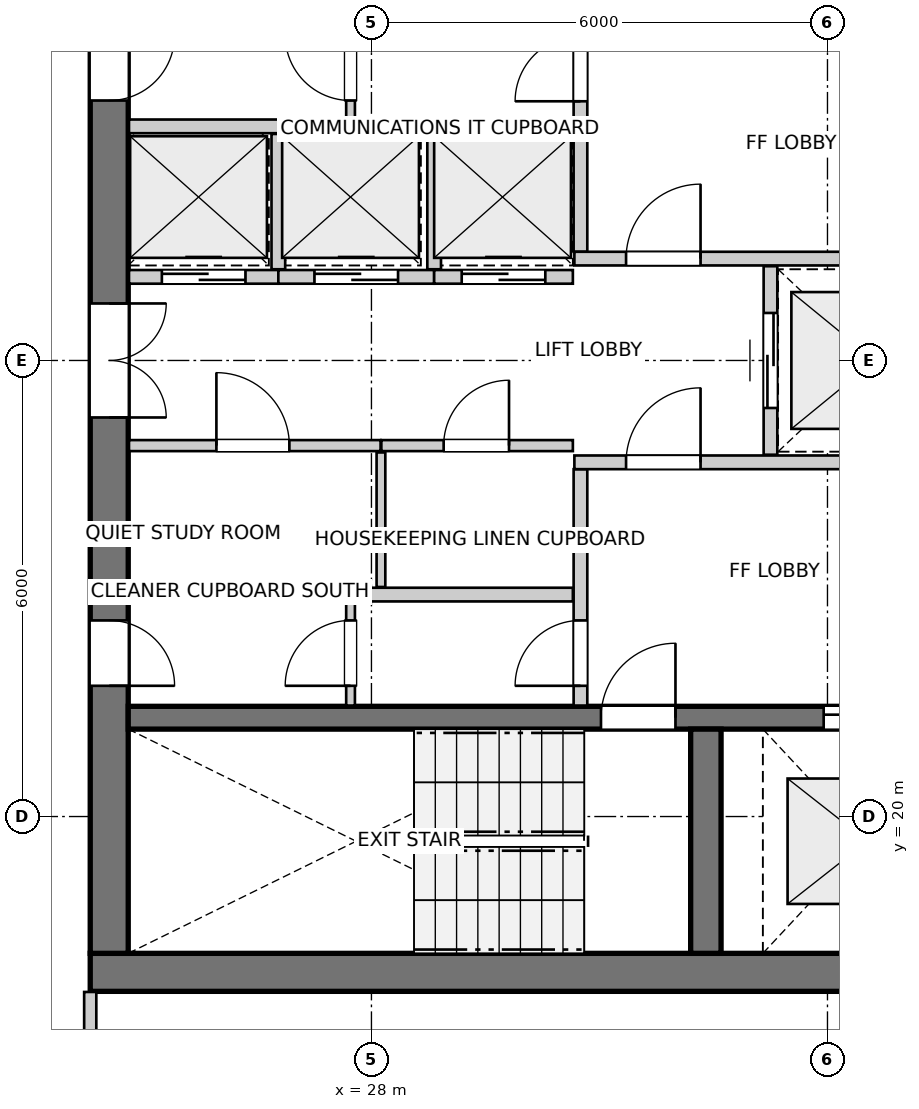
"""IFC4 building model, lengths in metres.
Left out: names, types, materials, properties, quantities, classifications, styles, units other than length and angle.
Written with IfcOpenShell. Run it as: python <this file> out.ifc"""

import sys

from ifc_helpers import new_model, si_unit, direction, frame, frame_2d, origin, place, context, subcontext, project, spatial, rectangle, extrude, source, transform, mapped, element, fill, save


model = new_model("IFC4")
c1 = context("Model", 3, precision=1e-05, world=origin(), true_north=direction((0.0, 1.0)))
c2 = subcontext(c1, "Body", "Model", "MODEL_VIEW")
j1 = project(units=[si_unit("LENGTHUNIT", "METRE"), si_unit("PLANEANGLEUNIT", "RADIAN")], contexts=[c1])
p1 = place(None, origin())
s1 = spatial("IfcSite", under=j1, at=p1, CompositionType="ELEMENT")
p2 = place(p1, origin())
s2 = spatial("IfcBuilding", under=s1, at=p2, CompositionType="ELEMENT")
p3 = place(p2, frame((0.0, 0.0, 205.2)))
s3 = spatial("IfcBuildingStorey", under=s2, at=p3, CompositionType="ELEMENT", Elevation=205.2)
p4 = place(p3, frame((24.3, 17.95, 0.0), z_axis=(0.0, 0.0, 1.0), x_axis=(1.0, 0.0, 0.0)))
e1 = element("IfcWall", 1, at=p4, inside=s3, PredefinedType="SHEAR", context=c2, shape_type="SweptSolid", body=[
    extrude(rectangle(XDim=12.1, YDim=0.5, at=frame_2d((6.05, 0.0))), origin(), (0.0, 0.0, 1.0), 2.935),
])
p5 = place(p3, frame((24.55, 33.8, 0.0), z_axis=(0.0, 0.0, 1.0), x_axis=(0.0, -1.0, 0.0)))
e2 = element("IfcWall", 2, at=p5, inside=s3, PredefinedType="SHEAR", context=c2, shape_type="SweptSolid", body=[
    extrude(rectangle(XDim=15.6, YDim=0.5, at=frame_2d((7.8, 0.0))), origin(), (0.0, 0.0, 1.0), 2.935),
])
p6 = place(p5, frame((7.05, 0.0, 0.0)))
e3 = element("IfcOpeningElement", 3, at=p6, cuts=e2, PredefinedType="OPENING", context=c2, shape_type="SweptSolid", body=[
    extrude(rectangle(XDim=1.5, YDim=2.15, at=frame_2d((0.75, 1.075))), frame((0.0, 0.26, 0.0), z_axis=(0.0, -1.0, 0.0), x_axis=(1.0, 0.0, 0.0)), (0.0, 0.0, 1.0), 0.52),
])
p7 = place(p5, frame((3.52, 0.0, 0.0)))
e4 = element("IfcOpeningElement", 4, at=p7, cuts=e2, PredefinedType="OPENING", context=c2, shape_type="SweptSolid", body=[
    extrude(rectangle(XDim=0.86, YDim=2.05, at=frame_2d((0.43, 1.025))), frame((0.0, 0.26, 0.0), z_axis=(0.0, -1.0, 0.0), x_axis=(1.0, 0.0, 0.0)), (0.0, 0.0, 1.0), 0.52),
])
p8 = place(p5, frame((11.22, 0.0, 0.0)))
e5 = element("IfcOpeningElement", 5, at=p8, cuts=e2, PredefinedType="OPENING", context=c2, shape_type="SweptSolid", body=[
    extrude(rectangle(XDim=0.86, YDim=2.05, at=frame_2d((0.43, 1.025))), frame((0.0, 0.26, 0.0), z_axis=(0.0, -1.0, 0.0), x_axis=(1.0, 0.0, 0.0)), (0.0, 0.0, 1.0), 0.52),
])
p9 = place(p3, frame((24.8, 21.3, 0.0), z_axis=(0.0, 0.0, 1.0), x_axis=(1.0, 0.0, 0.0)))
e6 = element("IfcWall", 6, at=p9, inside=s3, PredefinedType="SHEAR", context=c2, shape_type="SweptSolid", body=[
    extrude(rectangle(XDim=11.1, YDim=0.3, at=frame_2d((5.55, 0.0))), origin(), (0.0, 0.0, 1.0), 2.935),
])
p10 = place(p9, frame((6.22, 0.0, 0.0)))
e7 = element("IfcOpeningElement", 7, at=p10, cuts=e6, PredefinedType="OPENING", context=c2, shape_type="SweptSolid", body=[
    extrude(rectangle(XDim=0.98, YDim=2.15, at=frame_2d((0.49, 1.075))), frame((0.0, 0.16, 0.0), z_axis=(0.0, -1.0, 0.0), x_axis=(1.0, 0.0, 0.0)), (0.0, 0.0, 1.0), 0.32),
])
p11 = place(p9, frame((9.15, 0.0, 0.0)))
e8 = element("IfcOpeningElement", 8, at=p11, cuts=e6, PredefinedType="OPENING", context=c2, shape_type="SweptSolid", body=[
    extrude(rectangle(XDim=1.15, YDim=2.15, at=frame_2d((0.575, 1.075))), frame((0.0, 0.16, 0.0), z_axis=(0.0, -1.0, 0.0), x_axis=(1.0, 0.0, 0.0)), (0.0, 0.0, 1.0), 0.32),
])
p12 = place(p3, frame((32.4, 18.2, 0.0), z_axis=(0.0, 0.0, 1.0), x_axis=(0.0, 1.0, 0.0)))
e9 = element("IfcWall", 9, at=p12, inside=s3, PredefinedType="SHEAR", context=c2, shape_type="SweptSolid", body=[
    extrude(rectangle(XDim=2.95, YDim=0.4, at=frame_2d((1.475, 0.0))), origin(), (0.0, 0.0, 1.0), 2.935),
])
p13 = place(p3, frame((30.75, 21.46, 0.0), z_axis=(0.0, 0.0, 1.0), x_axis=(0.0, 1.0, 0.0)))
e10 = element("IfcWall", 10, at=p13, inside=s3, PredefinedType="PARTITIONING", context=c2, shape_type="SweptSolid", body=[
    extrude(rectangle(XDim=3.11, YDim=0.18, at=frame_2d((1.555, 0.0))), origin(), (0.0, 0.0, 1.0), 2.935),
])
p14 = place(p13, frame((0.26, 0.0, 0.0)))
e11 = element("IfcOpeningElement", 11, at=p14, cuts=e10, PredefinedType="OPENING", context=c2, shape_type="SweptSolid", body=[
    extrude(rectangle(XDim=0.86, YDim=2.05, at=frame_2d((0.43, 1.025))), frame((0.0, 0.1, 0.0), z_axis=(0.0, -1.0, 0.0), x_axis=(1.0, 0.0, 0.0)), (0.0, 0.0, 1.0), 0.2),
])
p15 = place(p3, frame((30.67, 24.66, 0.0), z_axis=(0.0, 0.0, 1.0), x_axis=(1.0, 0.0, 0.0)))
e12 = element("IfcWall", 12, at=p15, inside=s3, PredefinedType="PARTITIONING", context=c2, shape_type="SweptSolid", body=[
    extrude(rectangle(XDim=5.22, YDim=0.18, at=frame_2d((2.61, 0.0))), origin(), (0.0, 0.0, 1.0), 2.935),
])
p16 = place(p15, frame((0.68, 0.0, 0.0)))
e13 = element("IfcOpeningElement", 13, at=p16, cuts=e12, PredefinedType="OPENING", context=c2, shape_type="SweptSolid", body=[
    extrude(rectangle(XDim=0.98, YDim=2.15, at=frame_2d((0.49, 1.075))), frame((0.0, 0.1, 0.0), z_axis=(0.0, -1.0, 0.0), x_axis=(1.0, 0.0, 0.0)), (0.0, 0.0, 1.0), 0.2),
])
p17 = place(p3, frame((30.75, 27.43, 0.0), z_axis=(0.0, 0.0, 1.0), x_axis=(0.0, 1.0, 0.0)))
e14 = element("IfcWall", 14, at=p17, inside=s3, PredefinedType="PARTITIONING", context=c2, shape_type="SweptSolid", body=[
    extrude(rectangle(XDim=3.11, YDim=0.18, at=frame_2d((1.555, 0.0))), origin(), (0.0, 0.0, 1.0), 2.935),
])
p18 = place(p17, frame((1.98, 0.0, 0.0)))
e15 = element("IfcOpeningElement", 15, at=p18, cuts=e14, PredefinedType="OPENING", context=c2, shape_type="SweptSolid", body=[
    extrude(rectangle(XDim=0.86, YDim=2.05, at=frame_2d((0.43, 1.025))), frame((0.0, 0.1, 0.0), z_axis=(0.0, -1.0, 0.0), x_axis=(1.0, 0.0, 0.0)), (0.0, 0.0, 1.0), 0.2),
])
p19 = place(p3, frame((30.67, 27.34, 0.0), z_axis=(0.0, 0.0, 1.0), x_axis=(1.0, 0.0, 0.0)))
e16 = element("IfcWall", 16, at=p19, inside=s3, PredefinedType="PARTITIONING", context=c2, shape_type="SweptSolid", body=[
    extrude(rectangle(XDim=5.22, YDim=0.18, at=frame_2d((2.61, 0.0))), origin(), (0.0, 0.0, 1.0), 2.935),
])
p20 = place(p19, frame((0.68, 0.0, 0.0)))
e17 = element("IfcOpeningElement", 17, at=p20, cuts=e16, PredefinedType="OPENING", context=c2, shape_type="SweptSolid", body=[
    extrude(rectangle(XDim=0.98, YDim=2.15, at=frame_2d((0.49, 1.075))), frame((0.0, 0.1, 0.0), z_axis=(0.0, -1.0, 0.0), x_axis=(1.0, 0.0, 0.0)), (0.0, 0.0, 1.0), 0.2),
])
p21 = place(p3, frame((33.25, 24.76, 0.0), z_axis=(0.0, 0.0, 1.0), x_axis=(0.0, 1.0, 0.0)))
e18 = element("IfcWall", 18, at=p21, inside=s3, PredefinedType="PARTITIONING", context=c2, shape_type="SweptSolid", body=[
    extrude(rectangle(XDim=2.48, YDim=0.18, at=frame_2d((1.24, 0.0))), origin(), (0.0, 0.0, 1.0), 2.935),
])
p22 = place(p21, frame((0.615, 0.0, 0.0)))
e19 = element("IfcOpeningElement", 19, at=p22, cuts=e18, PredefinedType="OPENING", context=c2, shape_type="SweptSolid", body=[
    extrude(rectangle(XDim=1.25, YDim=2.15, at=frame_2d((0.625, 1.075))), frame((0.0, 0.1, 0.0), z_axis=(0.0, -1.0, 0.0), x_axis=(1.0, 0.0, 0.0)), (0.0, 0.0, 1.0), 0.2),
])
p23 = place(p3, frame((24.81, 22.92, 0.0), z_axis=(0.0, 0.0, 1.0), x_axis=(1.0, 0.0, 0.0)))
e20 = element("IfcWall", 20, at=p23, inside=s3, PredefinedType="PARTITIONING", context=c2, shape_type="SweptSolid", body=[
    extrude(rectangle(XDim=5.84, YDim=0.18, at=frame_2d((2.92, 0.0))), origin(), (0.0, 0.0, 1.0), 2.935),
])
p24 = place(p3, frame((24.81, 24.88, 0.0), z_axis=(0.0, 0.0, 1.0), x_axis=(1.0, 0.0, 0.0)))
e21 = element("IfcWall", 21, at=p24, inside=s3, PredefinedType="PARTITIONING", context=c2, shape_type="SweptSolid", body=[
    extrude(rectangle(XDim=3.31, YDim=0.145, at=frame_2d((1.655, 0.0))), origin(), (0.0, 0.0, 1.0), 2.935),
])
p25 = place(p24, frame((1.15, 0.0, 0.0)))
e22 = element("IfcOpeningElement", 22, at=p25, cuts=e21, PredefinedType="OPENING", context=c2, shape_type="SweptSolid", body=[
    extrude(rectangle(XDim=0.96, YDim=2.1, at=frame_2d((0.48, 1.05))), frame((0.0, 0.083, 0.0), z_axis=(0.0, -1.0, 0.0), x_axis=(1.0, 0.0, 0.0)), (0.0, 0.0, 1.0), 0.165),
])
p26 = place(p3, frame((28.13, 24.88, 0.0), z_axis=(0.0, 0.0, 1.0), x_axis=(1.0, 0.0, 0.0)))
e23 = element("IfcWall", 23, at=p26, inside=s3, PredefinedType="PARTITIONING", context=c2, shape_type="SweptSolid", body=[
    extrude(rectangle(XDim=2.52, YDim=0.145, at=frame_2d((1.26, 0.0))), origin(), (0.0, 0.0, 1.0), 2.935),
])
p27 = place(p26, frame((0.82, 0.0, 0.0)))
e24 = element("IfcOpeningElement", 24, at=p27, cuts=e23, PredefinedType="OPENING", context=c2, shape_type="SweptSolid", body=[
    extrude(rectangle(XDim=0.86, YDim=2.05, at=frame_2d((0.43, 1.025))), frame((0.0, 0.083, 0.0), z_axis=(0.0, -1.0, 0.0), x_axis=(1.0, 0.0, 0.0)), (0.0, 0.0, 1.0), 0.165),
])
p28 = place(p3, frame((28.125, 23.02, 0.0), z_axis=(0.0, 0.0, 1.0), x_axis=(0.0, 1.0, 0.0)))
e25 = element("IfcWall", 25, at=p28, inside=s3, PredefinedType="PARTITIONING", context=c2, shape_type="SweptSolid", body=[
    extrude(rectangle(XDim=1.77, YDim=0.115, at=frame_2d((0.885, 0.0))), origin(), (0.0, 0.0, 1.0), 2.935),
])
p29 = place(p3, frame((24.81, 29.08, 0.0), z_axis=(0.0, 0.0, 1.0), x_axis=(1.0, 0.0, 0.0)))
e26 = element("IfcWall", 26, at=p29, inside=s3, PredefinedType="PARTITIONING", context=c2, shape_type="SweptSolid", body=[
    extrude(rectangle(XDim=5.84, YDim=0.18, at=frame_2d((2.92, 0.0))), origin(), (0.0, 0.0, 1.0), 2.935),
])
p30 = place(p3, frame((24.81, 27.1, 0.0), z_axis=(0.0, 0.0, 1.0), x_axis=(1.0, 0.0, 0.0)))
e27 = element("IfcWall", 27, at=p30, inside=s3, PredefinedType="PARTITIONING", context=c2, shape_type="SweptSolid", body=[
    extrude(rectangle(XDim=1.965, YDim=0.18, at=frame_2d((0.982, 0.0))), origin(), (0.0, 0.0, 1.0), 2.935),
])
p31 = place(p30, frame((0.433, 0.0, 0.0)))
e28 = element("IfcOpeningElement", 28, at=p31, cuts=e27, PredefinedType="OPENING", context=c2, shape_type="SweptSolid", body=[
    extrude(rectangle(XDim=1.1, YDim=2.15, at=frame_2d((0.55, 1.075))), frame((0.0, 0.1, 0.0), z_axis=(0.0, -1.0, 0.0), x_axis=(1.0, 0.0, 0.0)), (0.0, 0.0, 1.0), 0.2),
])
p32 = place(p3, frame((26.775, 27.1, 0.0), z_axis=(0.0, 0.0, 1.0), x_axis=(1.0, 0.0, 0.0)))
e29 = element("IfcWall", 29, at=p32, inside=s3, PredefinedType="PARTITIONING", context=c2, shape_type="SweptSolid", body=[
    extrude(rectangle(XDim=2.05, YDim=0.18, at=frame_2d((1.025, 0.0))), origin(), (0.0, 0.0, 1.0), 2.935),
])
p33 = place(p32, frame((0.475, 0.0, 0.0)))
e30 = element("IfcOpeningElement", 30, at=p33, cuts=e29, PredefinedType="OPENING", context=c2, shape_type="SweptSolid", body=[
    extrude(rectangle(XDim=1.1, YDim=2.15, at=frame_2d((0.55, 1.075))), frame((0.0, 0.1, 0.0), z_axis=(0.0, -1.0, 0.0), x_axis=(1.0, 0.0, 0.0)), (0.0, 0.0, 1.0), 0.2),
])
p34 = place(p3, frame((26.775, 27.2, 0.0), z_axis=(0.0, 0.0, 1.0), x_axis=(0.0, 1.0, 0.0)))
e31 = element("IfcWall", 31, at=p34, inside=s3, PredefinedType="PARTITIONING", context=c2, shape_type="SweptSolid", body=[
    extrude(rectangle(XDim=1.78, YDim=0.18, at=frame_2d((0.89, 0.0))), origin(), (0.0, 0.0, 1.0), 2.935),
])
p35 = place(p3, frame((28.825, 27.1, 0.0), z_axis=(0.0, 0.0, 1.0), x_axis=(1.0, 0.0, 0.0)))
e32 = element("IfcWall", 32, at=p35, inside=s3, PredefinedType="PARTITIONING", context=c2, shape_type="SweptSolid", body=[
    extrude(rectangle(XDim=1.825, YDim=0.18, at=frame_2d((0.913, 0.0))), origin(), (0.0, 0.0, 1.0), 2.935),
])
p36 = place(p35, frame((0.363, 0.0, 0.0)))
e33 = element("IfcOpeningElement", 33, at=p36, cuts=e32, PredefinedType="OPENING", context=c2, shape_type="SweptSolid", body=[
    extrude(rectangle(XDim=1.1, YDim=2.15, at=frame_2d((0.55, 1.075))), frame((0.0, 0.1, 0.0), z_axis=(0.0, -1.0, 0.0), x_axis=(1.0, 0.0, 0.0)), (0.0, 0.0, 1.0), 0.2),
])
p37 = place(p3, frame((28.825, 27.2, 0.0), z_axis=(0.0, 0.0, 1.0), x_axis=(0.0, 1.0, 0.0)))
e34 = element("IfcWall", 34, at=p37, inside=s3, PredefinedType="PARTITIONING", context=c2, shape_type="SweptSolid", body=[
    extrude(rectangle(XDim=1.78, YDim=0.18, at=frame_2d((0.89, 0.0))), origin(), (0.0, 0.0, 1.0), 2.935),
])
p38 = place(p3, frame((27.725, 21.46, 0.0), z_axis=(0.0, 0.0, 1.0), x_axis=(0.0, 1.0, 0.0)))
e35 = element("IfcWall", 35, at=p38, inside=s3, PredefinedType="PARTITIONING", context=c2, shape_type="SweptSolid", body=[
    extrude(rectangle(XDim=1.38, YDim=0.115, at=frame_2d((0.69, 0.0))), origin(), (0.0, 0.0, 1.0), 2.935),
])
p39 = place(p38, frame((0.26, 0.0, 0.0)))
e36 = element("IfcOpeningElement", 36, at=p39, cuts=e35, PredefinedType="OPENING", context=c2, shape_type="SweptSolid", body=[
    extrude(rectangle(XDim=0.86, YDim=2.05, at=frame_2d((0.43, 1.025))), frame((0.0, 0.067, 0.0), z_axis=(0.0, -1.0, 0.0), x_axis=(1.0, 0.0, 0.0)), (0.0, 0.0, 1.0), 0.135),
])
p40 = place(p3, frame((27.725, 29.16, 0.0), z_axis=(0.0, 0.0, 1.0), x_axis=(0.0, 1.0, 0.0)))
e37 = element("IfcWall", 37, at=p40, inside=s3, PredefinedType="PARTITIONING", context=c2, shape_type="SweptSolid", body=[
    extrude(rectangle(XDim=1.38, YDim=0.115, at=frame_2d((0.69, 0.0))), origin(), (0.0, 0.0, 1.0), 2.935),
])
p41 = place(p40, frame((0.26, 0.0, 0.0)))
e38 = element("IfcOpeningElement", 38, at=p41, cuts=e37, PredefinedType="OPENING", context=c2, shape_type="SweptSolid", body=[
    extrude(rectangle(XDim=0.86, YDim=2.05, at=frame_2d((0.43, 1.025))), frame((0.0, 0.067, 0.0), z_axis=(0.0, -1.0, 0.0), x_axis=(1.0, 0.0, 0.0)), (0.0, 0.0, 1.0), 0.135),
])
p42 = place(p3, frame((24.3, 15.002, 0.0), z_axis=(0.0, 0.0, 1.0), x_axis=(0.0, 1.0, 0.0)))
e39 = element("IfcWall", 39, at=p42, inside=s3, PredefinedType="PARTITIONING", context=c2, shape_type="SweptSolid", body=[
    extrude(rectangle(XDim=2.69, YDim=0.16, at=frame_2d((1.345, 0.0))), origin(), (0.0, 0.0, 1.0), 2.935),
])
m1 = source(origin(), c2, "Body", "SweptSolid", [
    extrude(rectangle(XDim=0.98, YDim=2.15, at=frame_2d((0.49, 1.075))), frame((0.0, 0.025, 0.0), z_axis=(0.0, -1.0, 0.0), x_axis=(1.0, 0.0, 0.0)), (0.0, 0.0, 1.0), 0.05),
])
p43 = place(p10, origin())
e40 = element("IfcDoor", 40, at=p43, inside=s3, OperationType="SINGLE_SWING_RIGHT", PredefinedType="DOOR", context=c2, shape_type="MappedRepresentation", body=[
    mapped(m1, transform((0.0, 0.0, 0.0), x_axis=(1.0, 0.0, 0.0), y_axis=(0.0, 1.0, 0.0), z_axis=(0.0, 0.0, 1.0), scale=1.0)),
])
fill(e7, e40)
m2 = source(origin(), c2, "Body", "SweptSolid", [
    extrude(rectangle(XDim=1.15, YDim=2.15, at=frame_2d((0.575, 1.075))), frame((0.0, 0.025, 0.0), z_axis=(0.0, -1.0, 0.0), x_axis=(1.0, 0.0, 0.0)), (0.0, 0.0, 1.0), 0.05),
])
p44 = place(p11, origin())
e41 = element("IfcDoor", 41, at=p44, inside=s3, OperationType="DOUBLE_DOOR_SLIDING", PredefinedType="DOOR", context=c2, shape_type="MappedRepresentation", body=[
    mapped(m2, transform((0.0, 0.0, 0.0), x_axis=(1.0, 0.0, 0.0), y_axis=(0.0, 1.0, 0.0), z_axis=(0.0, 0.0, 1.0), scale=1.0)),
])
fill(e8, e41)
m3 = source(origin(), c2, "Body", "SweptSolid", [
    extrude(rectangle(XDim=1.5, YDim=2.15, at=frame_2d((0.75, 1.075))), frame((0.0, 0.025, 0.0), z_axis=(0.0, -1.0, 0.0), x_axis=(1.0, 0.0, 0.0)), (0.0, 0.0, 1.0), 0.05),
])
p45 = place(p6, origin())
e42 = element("IfcDoor", 42, at=p45, inside=s3, OperationType="DOUBLE_DOOR_SINGLE_SWING", PredefinedType="DOOR", context=c2, shape_type="MappedRepresentation", body=[
    mapped(m3, transform((0.0, 0.0, 0.0), x_axis=(1.0, 0.0, 0.0), y_axis=(0.0, 1.0, 0.0), z_axis=(0.0, 0.0, 1.0), scale=1.0)),
])
fill(e3, e42)
m4 = source(origin(), c2, "Body", "SweptSolid", [
    extrude(rectangle(XDim=0.86, YDim=2.05, at=frame_2d((0.43, 1.025))), frame((0.0, 0.025, 0.0), z_axis=(0.0, -1.0, 0.0), x_axis=(1.0, 0.0, 0.0)), (0.0, 0.0, 1.0), 0.05),
])
p46 = place(p7, origin())
e43 = element("IfcDoor", 43, at=p46, inside=s3, OperationType="SINGLE_SWING_LEFT", PredefinedType="DOOR", context=c2, shape_type="MappedRepresentation", body=[
    mapped(m4, transform((0.0, 0.0, 0.0), x_axis=(1.0, 0.0, 0.0), y_axis=(0.0, 1.0, 0.0), z_axis=(0.0, 0.0, 1.0), scale=1.0)),
])
fill(e4, e43)
p47 = place(p8, origin())
e44 = element("IfcDoor", 44, at=p47, inside=s3, OperationType="SINGLE_SWING_RIGHT", PredefinedType="DOOR", context=c2, shape_type="MappedRepresentation", body=[
    mapped(m4, transform((0.0, 0.0, 0.0), x_axis=(1.0, 0.0, 0.0), y_axis=(0.0, 1.0, 0.0), z_axis=(0.0, 0.0, 1.0), scale=1.0)),
])
fill(e5, e44)
p48 = place(p14, origin())
e45 = element("IfcDoor", 45, at=p48, inside=s3, OperationType="SINGLE_SWING_LEFT", PredefinedType="DOOR", context=c2, shape_type="MappedRepresentation", body=[
    mapped(m4, transform((0.0, 0.0, 0.0), x_axis=(1.0, 0.0, 0.0), y_axis=(0.0, 1.0, 0.0), z_axis=(0.0, 0.0, 1.0), scale=1.0)),
])
fill(e11, e45)
p49 = place(p16, origin())
e46 = element("IfcDoor", 46, at=p49, inside=s3, OperationType="SINGLE_SWING_RIGHT", PredefinedType="DOOR", context=c2, shape_type="MappedRepresentation", body=[
    mapped(m1, transform((0.0, 0.0, 0.0), x_axis=(1.0, 0.0, 0.0), y_axis=(0.0, 1.0, 0.0), z_axis=(0.0, 0.0, 1.0), scale=1.0)),
])
fill(e13, e46)
p50 = place(p18, origin())
e47 = element("IfcDoor", 47, at=p50, inside=s3, OperationType="SINGLE_SWING_LEFT", PredefinedType="DOOR", context=c2, shape_type="MappedRepresentation", body=[
    mapped(m4, transform((0.0, 0.0, 0.0), x_axis=(1.0, 0.0, 0.0), y_axis=(0.0, 1.0, 0.0), z_axis=(0.0, 0.0, 1.0), scale=1.0)),
])
fill(e15, e47)
p51 = place(p20, origin())
e48 = element("IfcDoor", 48, at=p51, inside=s3, OperationType="SINGLE_SWING_RIGHT", PredefinedType="DOOR", context=c2, shape_type="MappedRepresentation", body=[
    mapped(m1, transform((0.0, 0.0, 0.0), x_axis=(1.0, 0.0, 0.0), y_axis=(0.0, 1.0, 0.0), z_axis=(0.0, 0.0, 1.0), scale=1.0)),
])
fill(e17, e48)
m5 = source(origin(), c2, "Body", "SweptSolid", [
    extrude(rectangle(XDim=1.25, YDim=2.15, at=frame_2d((0.625, 1.075))), frame((0.0, 0.025, 0.0), z_axis=(0.0, -1.0, 0.0), x_axis=(1.0, 0.0, 0.0)), (0.0, 0.0, 1.0), 0.05),
])
p52 = place(p22, origin())
e49 = element("IfcDoor", 49, at=p52, inside=s3, OperationType="DOUBLE_DOOR_SLIDING", PredefinedType="DOOR", context=c2, shape_type="MappedRepresentation", body=[
    mapped(m5, transform((0.0, 0.0, 0.0), x_axis=(1.0, 0.0, 0.0), y_axis=(0.0, 1.0, 0.0), z_axis=(0.0, 0.0, 1.0), scale=1.0)),
])
fill(e19, e49)
m6 = source(origin(), c2, "Body", "SweptSolid", [
    extrude(rectangle(XDim=0.96, YDim=2.1, at=frame_2d((0.48, 1.05))), frame((0.0, 0.025, 0.0), z_axis=(0.0, -1.0, 0.0), x_axis=(1.0, 0.0, 0.0)), (0.0, 0.0, 1.0), 0.05),
])
p53 = place(p25, origin())
e50 = element("IfcDoor", 50, at=p53, inside=s3, OperationType="SINGLE_SWING_LEFT", PredefinedType="DOOR", context=c2, shape_type="MappedRepresentation", body=[
    mapped(m6, transform((0.0, 0.0, 0.0), x_axis=(1.0, 0.0, 0.0), y_axis=(0.0, 1.0, 0.0), z_axis=(0.0, 0.0, 1.0), scale=1.0)),
])
fill(e22, e50)
p54 = place(p27, origin())
e51 = element("IfcDoor", 51, at=p54, inside=s3, OperationType="SINGLE_SWING_RIGHT", PredefinedType="DOOR", context=c2, shape_type="MappedRepresentation", body=[
    mapped(m4, transform((0.0, 0.0, 0.0), x_axis=(1.0, 0.0, 0.0), y_axis=(0.0, 1.0, 0.0), z_axis=(0.0, 0.0, 1.0), scale=1.0)),
])
fill(e24, e51)
m7 = source(origin(), c2, "Body", "SweptSolid", [
    extrude(rectangle(XDim=1.1, YDim=2.15, at=frame_2d((0.55, 1.075))), frame((0.0, 0.025, 0.0), z_axis=(0.0, -1.0, 0.0), x_axis=(1.0, 0.0, 0.0)), (0.0, 0.0, 1.0), 0.05),
])
p55 = place(p31, origin())
e52 = element("IfcDoor", 52, at=p55, inside=s3, OperationType="DOUBLE_DOOR_SLIDING", PredefinedType="DOOR", context=c2, shape_type="MappedRepresentation", body=[
    mapped(m7, transform((0.0, 0.0, 0.0), x_axis=(1.0, 0.0, 0.0), y_axis=(0.0, 1.0, 0.0), z_axis=(0.0, 0.0, 1.0), scale=1.0)),
])
fill(e28, e52)
p56 = place(p33, origin())
e53 = element("IfcDoor", 53, at=p56, inside=s3, OperationType="DOUBLE_DOOR_SLIDING", PredefinedType="DOOR", context=c2, shape_type="MappedRepresentation", body=[
    mapped(m7, transform((0.0, 0.0, 0.0), x_axis=(1.0, 0.0, 0.0), y_axis=(0.0, 1.0, 0.0), z_axis=(0.0, 0.0, 1.0), scale=1.0)),
])
fill(e30, e53)
p57 = place(p36, origin())
e54 = element("IfcDoor", 54, at=p57, inside=s3, OperationType="DOUBLE_DOOR_SLIDING", PredefinedType="DOOR", context=c2, shape_type="MappedRepresentation", body=[
    mapped(m7, transform((0.0, 0.0, 0.0), x_axis=(1.0, 0.0, 0.0), y_axis=(0.0, 1.0, 0.0), z_axis=(0.0, 0.0, 1.0), scale=1.0)),
])
fill(e33, e54)
p58 = place(p39, origin())
e55 = element("IfcDoor", 55, at=p58, inside=s3, OperationType="SINGLE_SWING_LEFT", PredefinedType="DOOR", context=c2, shape_type="MappedRepresentation", body=[
    mapped(m4, transform((0.0, 0.0, 0.0), x_axis=(1.0, 0.0, 0.0), y_axis=(0.0, 1.0, 0.0), z_axis=(0.0, 0.0, 1.0), scale=1.0)),
])
fill(e36, e55)
p59 = place(p41, origin())
e56 = element("IfcDoor", 56, at=p59, inside=s3, OperationType="SINGLE_SWING_RIGHT", PredefinedType="DOOR", context=c2, shape_type="MappedRepresentation", body=[
    mapped(m4, transform((0.0, 0.0, 0.0), x_axis=(1.0, 0.0, 0.0), y_axis=(0.0, 1.0, 0.0), z_axis=(0.0, 0.0, 1.0), scale=1.0)),
])
fill(e38, e56)
save(model, sys.argv[1])
